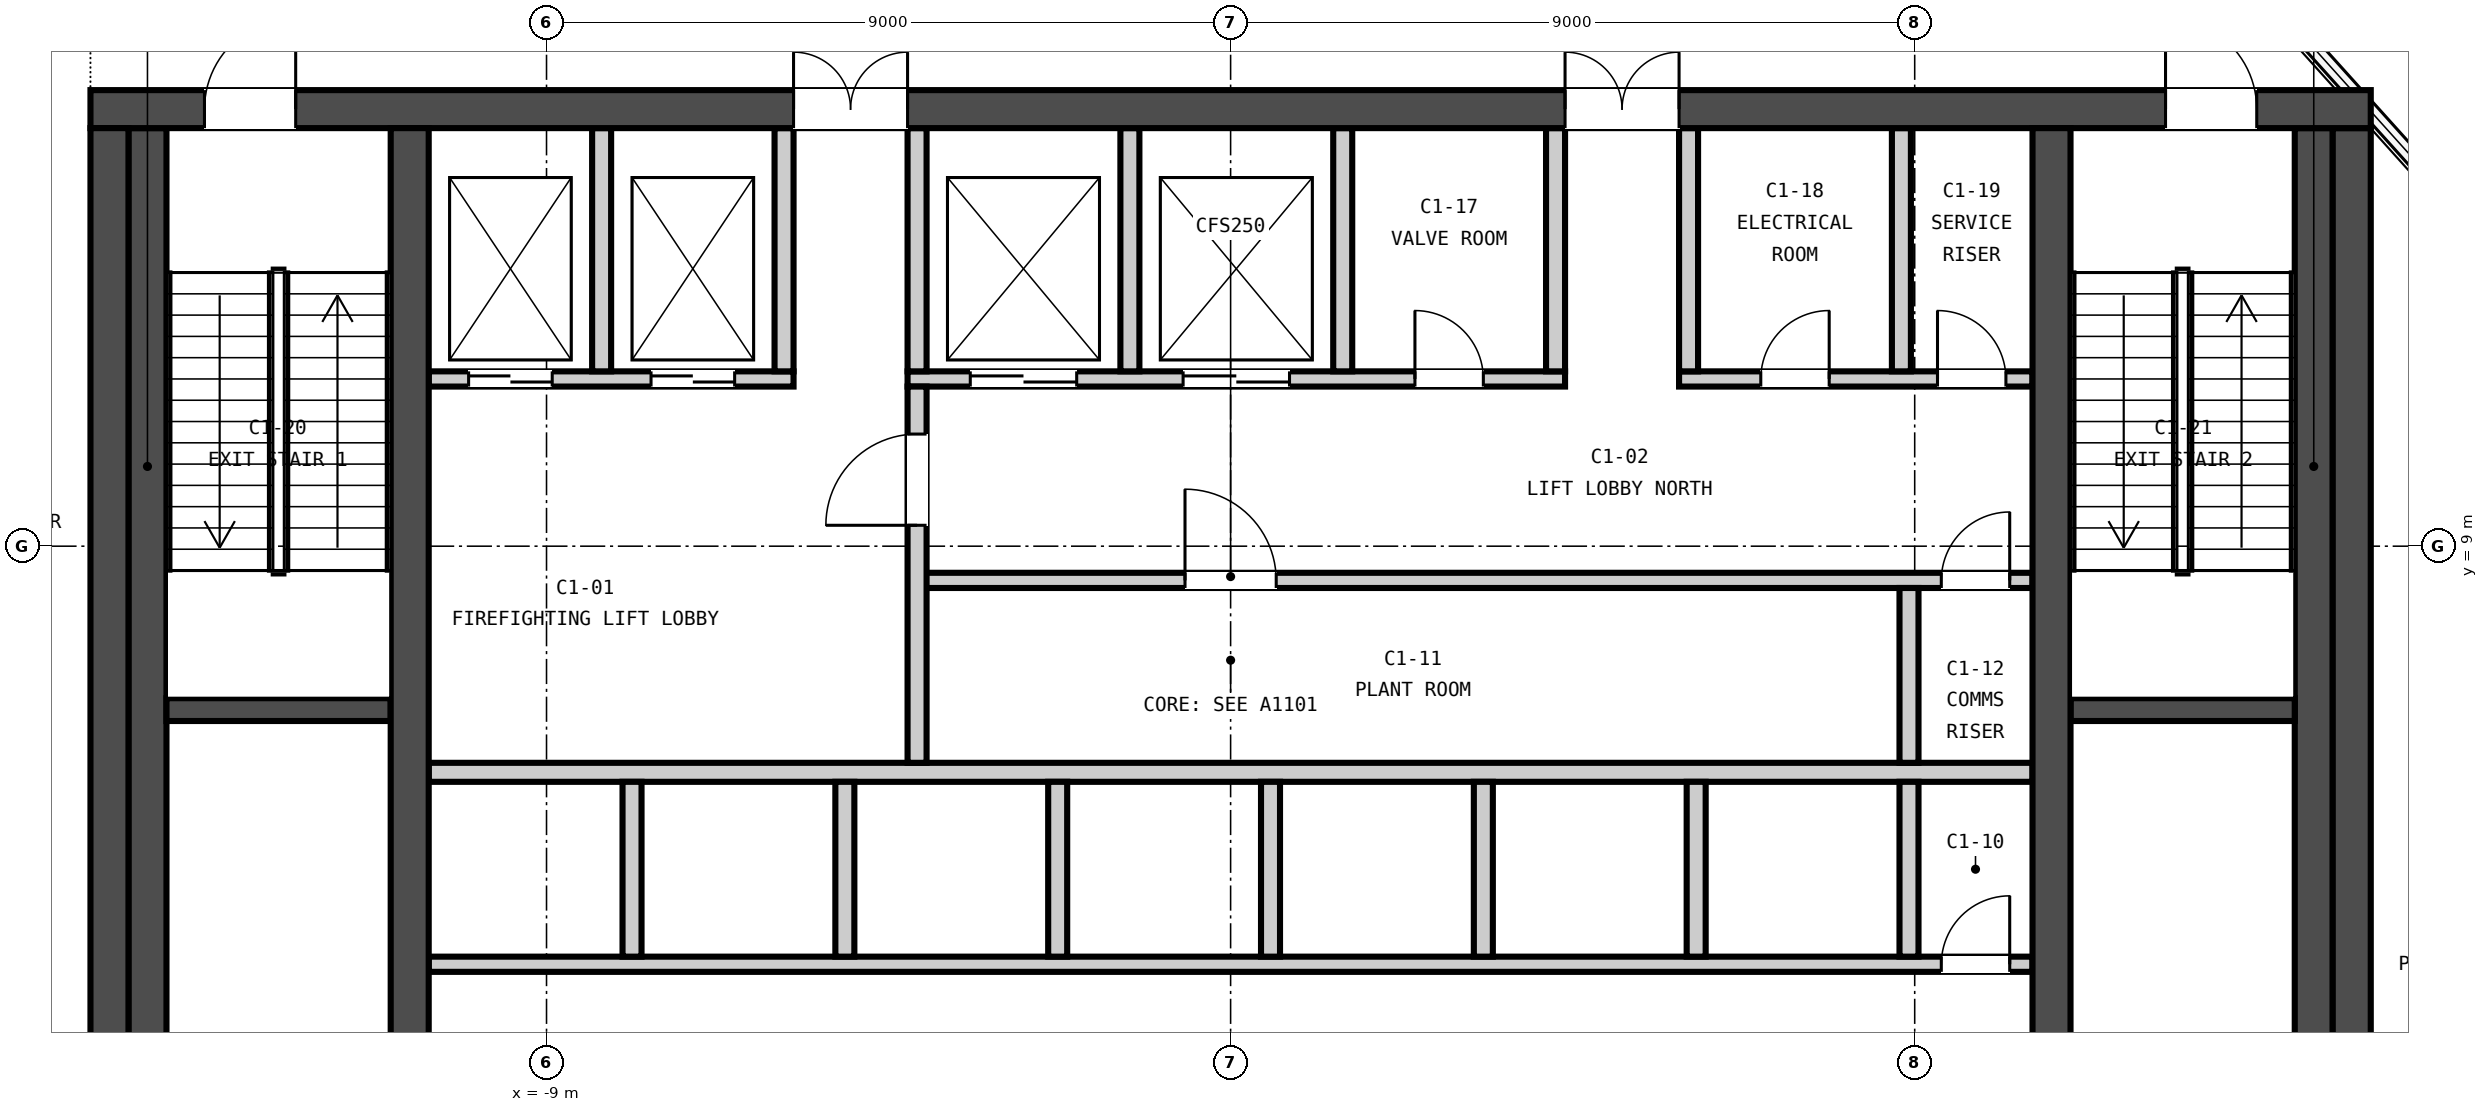
"""IFC4 building model, lengths in metres.
Left out: names, types, materials, properties, quantities, classifications, styles, units other than length and angle.
Written with IfcOpenShell. Run it as: python <this file> out.ifc"""

import sys

from ifc_helpers import new_model, si_unit, direction, frame, frame_2d, origin, place, context, subcontext, project, spatial, rectangle, extrude, element, fill, save


model = new_model("IFC4")
c1 = context("Model", 3, precision=1e-05, world=origin(), true_north=direction((0.0, 1.0)))
c2 = subcontext(c1, "Body", "Model", "MODEL_VIEW")
j1 = project(units=[si_unit("LENGTHUNIT", "METRE"), si_unit("PLANEANGLEUNIT", "RADIAN")], contexts=[c1])
p1 = place(None, origin())
s1 = spatial("IfcSite", under=j1, at=p1, CompositionType="ELEMENT")
p2 = place(p1, origin())
s2 = spatial("IfcBuilding", under=s1, at=p2, CompositionType="ELEMENT")
p3 = place(p2, frame((0.0, 0.0, 301.1)))
s3 = spatial("IfcBuildingStorey", under=s2, at=p3, CompositionType="ELEMENT", Elevation=301.1)
p4 = place(p3, frame((-15.0, 14.75, -0.25), z_axis=(0.0, 0.0, 1.0), x_axis=(1.0, 0.0, 0.0)))
e1 = element("IfcWall", 1, at=p4, inside=s3, PredefinedType="SOLIDWALL", context=c2, shape_type="SweptSolid", body=[
    extrude(rectangle(XDim=30.0, YDim=0.5, at=frame_2d((15.0, 0.0))), origin(), (0.0, 0.0, 1.0), 5.0),
])
p5 = place(p4, frame((9.25, 0.0, 0.25)))
e2 = element("IfcOpeningElement", 2, at=p5, cuts=e1, PredefinedType="OPENING", context=c2, shape_type="SweptSolid", body=[
    extrude(rectangle(XDim=1.5, YDim=2.1, at=frame_2d((0.75, 1.05))), frame((0.0, 0.26, 0.0), z_axis=(0.0, -1.0, 0.0), x_axis=(1.0, 0.0, 0.0)), (0.0, 0.0, 1.0), 0.52),
])
p6 = place(p4, frame((19.4, 0.0, 0.25)))
e3 = element("IfcOpeningElement", 3, at=p6, cuts=e1, PredefinedType="OPENING", context=c2, shape_type="SweptSolid", body=[
    extrude(rectangle(XDim=1.5, YDim=2.1, at=frame_2d((0.75, 1.05))), frame((0.0, 0.26, 0.0), z_axis=(0.0, -1.0, 0.0), x_axis=(1.0, 0.0, 0.0)), (0.0, 0.0, 1.0), 0.52),
])
p7 = place(p4, frame((1.5, 0.0, 0.25)))
e4 = element("IfcOpeningElement", 4, at=p7, cuts=e1, PredefinedType="OPENING", context=c2, shape_type="SweptSolid", body=[
    extrude(rectangle(XDim=1.2, YDim=2.1, at=frame_2d((0.6, 1.05))), frame((0.0, 0.26, 0.0), z_axis=(0.0, -1.0, 0.0), x_axis=(1.0, 0.0, 0.0)), (0.0, 0.0, 1.0), 0.52),
])
p8 = place(p4, frame((27.3, 0.0, 0.25)))
e5 = element("IfcOpeningElement", 5, at=p8, cuts=e1, PredefinedType="OPENING", context=c2, shape_type="SweptSolid", body=[
    extrude(rectangle(XDim=1.2, YDim=2.1, at=frame_2d((0.6, 1.05))), frame((0.0, 0.26, 0.0), z_axis=(0.0, -1.0, 0.0), x_axis=(1.0, 0.0, 0.0)), (0.0, 0.0, 1.0), 0.52),
])
for number, where, z_axis, x_axis in (
    (6, (-14.75, 0.5, -0.25), (0.0, 0.0, 1.0), (0.0, 1.0, 0.0)),
    (7, (14.75, 0.5, -0.25), (0.0, 0.0, 1.0), (0.0, 1.0, 0.0)),
    (8, (-10.8, 0.5, -0.25), (0.0, 0.0, 1.0), (0.0, 1.0, 0.0)),
    (9, (10.8, 0.5, -0.25), (0.0, 0.0, 1.0), (0.0, 1.0, 0.0)),
):
    element("IfcWall", number, at=place(p3, frame(where, z_axis=z_axis, x_axis=x_axis)), inside=s3, PredefinedType="SOLIDWALL", context=c2, shape_type="SweptSolid", body=[
        extrude(rectangle(XDim=14.0, YDim=0.5, at=frame_2d((7.0, 0.0))), origin(), (0.0, 0.0, 1.0), 5.0),
    ])
p9 = place(p3, frame((-10.55, 3.5, 0.0), z_axis=(0.0, 0.0, 1.0), x_axis=(1.0, 0.0, 0.0)))
e10 = element("IfcWall", 10, at=p9, inside=s3, PredefinedType="PARTITIONING", context=c2, shape_type="SweptSolid", body=[
    extrude(rectangle(XDim=21.1, YDim=0.2, at=frame_2d((10.55, 0.0))), origin(), (0.0, 0.0, 1.0), 4.75),
])
p10 = place(p9, frame((19.9, 0.0, 0.0)))
e11 = element("IfcOpeningElement", 11, at=p10, cuts=e10, PredefinedType="OPENING", context=c2, shape_type="SweptSolid", body=[
    extrude(rectangle(XDim=0.9, YDim=2.1, at=frame_2d((0.45, 1.05))), frame((0.0, 0.11, 0.0), z_axis=(0.0, -1.0, 0.0), x_axis=(1.0, 0.0, 0.0)), (0.0, 0.0, 1.0), 0.22),
])
p11 = place(p3, frame((-10.55, 6.025, 0.0), z_axis=(0.0, 0.0, 1.0), x_axis=(1.0, 0.0, 0.0)))
e12 = element("IfcWall", 12, at=p11, inside=s3, PredefinedType="PARTITIONING", context=c2, shape_type="SweptSolid", body=[
    extrude(rectangle(XDim=21.1, YDim=0.25, at=frame_2d((10.55, 0.0))), origin(), (0.0, 0.0, 1.0), 4.75),
])
p12 = place(p3, frame((-4.125, 8.55, 0.0), z_axis=(0.0, 0.0, 1.0), x_axis=(1.0, 0.0, 0.0)))
e13 = element("IfcWall", 13, at=p12, inside=s3, PredefinedType="PARTITIONING", context=c2, shape_type="SweptSolid", body=[
    extrude(rectangle(XDim=14.675, YDim=0.2, at=frame_2d((7.337, 0.0))), origin(), (0.0, 0.0, 1.0), 4.75),
])
p13 = place(p12, frame((3.525, 0.0, 0.0)))
e14 = element("IfcOpeningElement", 14, at=p13, cuts=e13, PredefinedType="OPENING", context=c2, shape_type="SweptSolid", body=[
    extrude(rectangle(XDim=1.2, YDim=2.1, at=frame_2d((0.6, 1.05))), frame((0.0, 0.11, 0.0), z_axis=(0.0, -1.0, 0.0), x_axis=(1.0, 0.0, 0.0)), (0.0, 0.0, 1.0), 0.22),
])
p14 = place(p12, frame((13.475, 0.0, 0.0)))
e15 = element("IfcOpeningElement", 15, at=p14, cuts=e13, PredefinedType="OPENING", context=c2, shape_type="SweptSolid", body=[
    extrude(rectangle(XDim=0.9, YDim=2.1, at=frame_2d((0.45, 1.05))), frame((0.0, 0.11, 0.0), z_axis=(0.0, -1.0, 0.0), x_axis=(1.0, 0.0, 0.0)), (0.0, 0.0, 1.0), 0.22),
])
p15 = place(p3, frame((-10.55, 11.2, 0.0), z_axis=(0.0, 0.0, 1.0), x_axis=(1.0, 0.0, 0.0)))
e16 = element("IfcWall", 16, at=p15, inside=s3, PredefinedType="PARTITIONING", context=c2, shape_type="SweptSolid", body=[
    extrude(rectangle(XDim=4.8, YDim=0.2, at=frame_2d((2.4, 0.0))), origin(), (0.0, 0.0, 1.0), 4.75),
])
p16 = place(p15, frame((0.525, 0.0, 0.0)))
e17 = element("IfcOpeningElement", 17, at=p16, cuts=e16, PredefinedType="OPENING", context=c2, shape_type="SweptSolid", body=[
    extrude(rectangle(XDim=1.1, YDim=2.1, at=frame_2d((0.55, 1.05))), frame((0.0, 0.11, 0.0), z_axis=(0.0, -1.0, 0.0), x_axis=(1.0, 0.0, 0.0)), (0.0, 0.0, 1.0), 0.22),
])
p17 = place(p15, frame((2.925, 0.0, 0.0)))
e18 = element("IfcOpeningElement", 18, at=p17, cuts=e16, PredefinedType="OPENING", context=c2, shape_type="SweptSolid", body=[
    extrude(rectangle(XDim=1.1, YDim=2.1, at=frame_2d((0.55, 1.05))), frame((0.0, 0.11, 0.0), z_axis=(0.0, -1.0, 0.0), x_axis=(1.0, 0.0, 0.0)), (0.0, 0.0, 1.0), 0.22),
])
p18 = place(p3, frame((-4.25, 11.2, 0.0), z_axis=(0.0, 0.0, 1.0), x_axis=(1.0, 0.0, 0.0)))
e19 = element("IfcWall", 19, at=p18, inside=s3, PredefinedType="PARTITIONING", context=c2, shape_type="SweptSolid", body=[
    extrude(rectangle(XDim=8.65, YDim=0.2, at=frame_2d((4.325, 0.0))), origin(), (0.0, 0.0, 1.0), 4.75),
])
p19 = place(p18, frame((0.825, 0.0, 0.0)))
e20 = element("IfcOpeningElement", 20, at=p19, cuts=e19, PredefinedType="OPENING", context=c2, shape_type="SweptSolid", body=[
    extrude(rectangle(XDim=1.4, YDim=2.1, at=frame_2d((0.7, 1.05))), frame((0.0, 0.11, 0.0), z_axis=(0.0, -1.0, 0.0), x_axis=(1.0, 0.0, 0.0)), (0.0, 0.0, 1.0), 0.22),
])
p20 = place(p18, frame((3.625, 0.0, 0.0)))
e21 = element("IfcOpeningElement", 21, at=p20, cuts=e19, PredefinedType="OPENING", context=c2, shape_type="SweptSolid", body=[
    extrude(rectangle(XDim=1.4, YDim=2.1, at=frame_2d((0.7, 1.05))), frame((0.0, 0.11, 0.0), z_axis=(0.0, -1.0, 0.0), x_axis=(1.0, 0.0, 0.0)), (0.0, 0.0, 1.0), 0.22),
])
p21 = place(p18, frame((6.675, 0.0, 0.0)))
e22 = element("IfcOpeningElement", 22, at=p21, cuts=e19, PredefinedType="OPENING", context=c2, shape_type="SweptSolid", body=[
    extrude(rectangle(XDim=0.9, YDim=2.1, at=frame_2d((0.45, 1.05))), frame((0.0, 0.11, 0.0), z_axis=(0.0, -1.0, 0.0), x_axis=(1.0, 0.0, 0.0)), (0.0, 0.0, 1.0), 0.22),
])
p22 = place(p3, frame((5.9, 11.2, 0.0), z_axis=(0.0, 0.0, 1.0), x_axis=(1.0, 0.0, 0.0)))
e23 = element("IfcWall", 23, at=p22, inside=s3, PredefinedType="PARTITIONING", context=c2, shape_type="SweptSolid", body=[
    extrude(rectangle(XDim=4.65, YDim=0.2, at=frame_2d((2.325, 0.0))), origin(), (0.0, 0.0, 1.0), 4.75),
])
p23 = place(p22, frame((1.075, 0.0, 0.0)))
e24 = element("IfcOpeningElement", 24, at=p23, cuts=e23, PredefinedType="OPENING", context=c2, shape_type="SweptSolid", body=[
    extrude(rectangle(XDim=0.9, YDim=2.1, at=frame_2d((0.45, 1.05))), frame((0.0, 0.11, 0.0), z_axis=(0.0, -1.0, 0.0), x_axis=(1.0, 0.0, 0.0)), (0.0, 0.0, 1.0), 0.22),
])
p24 = place(p22, frame((3.4, 0.0, 0.0)))
e25 = element("IfcOpeningElement", 25, at=p24, cuts=e23, PredefinedType="OPENING", context=c2, shape_type="SweptSolid", body=[
    extrude(rectangle(XDim=0.9, YDim=2.1, at=frame_2d((0.45, 1.05))), frame((0.0, 0.11, 0.0), z_axis=(0.0, -1.0, 0.0), x_axis=(1.0, 0.0, 0.0)), (0.0, 0.0, 1.0), 0.22),
])
p25 = place(p3, frame((-4.125, 6.15, 0.0), z_axis=(0.0, 0.0, 1.0), x_axis=(0.0, 1.0, 0.0)))
e26 = element("IfcWall", 26, at=p25, inside=s3, PredefinedType="PARTITIONING", context=c2, shape_type="SweptSolid", body=[
    extrude(rectangle(XDim=4.95, YDim=0.25, at=frame_2d((2.475, 0.0))), origin(), (0.0, 0.0, 1.0), 4.75),
])
p26 = place(p25, frame((3.125, 0.0, 0.0)))
e27 = element("IfcOpeningElement", 27, at=p26, cuts=e26, PredefinedType="OPENING", context=c2, shape_type="SweptSolid", body=[
    extrude(rectangle(XDim=1.2, YDim=2.1, at=frame_2d((0.6, 1.05))), frame((0.0, 0.135, 0.0), z_axis=(0.0, -1.0, 0.0), x_axis=(1.0, 0.0, 0.0)), (0.0, 0.0, 1.0), 0.27),
])
for number, where, z_axis, x_axis in (
    (28, (-7.875, 3.6, 0.0), (0.0, 0.0, 1.0), (0.0, 1.0, 0.0)),
    (29, (-5.075, 3.6, 0.0), (0.0, 0.0, 1.0), (0.0, 1.0, 0.0)),
    (30, (-2.275, 3.6, 0.0), (0.0, 0.0, 1.0), (0.0, 1.0, 0.0)),
    (31, (0.525, 3.6, 0.0), (0.0, 0.0, 1.0), (0.0, 1.0, 0.0)),
    (32, (3.325, 3.6, 0.0), (0.0, 0.0, 1.0), (0.0, 1.0, 0.0)),
    (33, (6.125, 3.6, 0.0), (0.0, 0.0, 1.0), (0.0, 1.0, 0.0)),
    (34, (8.925, 3.6, 0.0), (0.0, 0.0, 1.0), (0.0, 1.0, 0.0)),
):
    element("IfcWall", number, at=place(p3, frame(where, z_axis=z_axis, x_axis=x_axis)), inside=s3, PredefinedType="PARTITIONING", context=c2, shape_type="SweptSolid", body=[
        extrude(rectangle(XDim=2.3, YDim=0.25, at=frame_2d((1.15, 0.0))), origin(), (0.0, 0.0, 1.0), 4.75),
    ])
p27 = place(p3, frame((8.925, 6.15, 0.0), z_axis=(0.0, 0.0, 1.0), x_axis=(0.0, 1.0, 0.0)))
e35 = element("IfcWall", 35, at=p27, inside=s3, PredefinedType="PARTITIONING", context=c2, shape_type="SweptSolid", body=[
    extrude(rectangle(XDim=2.3, YDim=0.25, at=frame_2d((1.15, 0.0))), origin(), (0.0, 0.0, 1.0), 4.75),
])
for number, where, z_axis, x_axis in (
    (36, (-8.275, 11.3, 0.0), (0.0, 0.0, 1.0), (0.0, 1.0, 0.0)),
    (37, (-5.875, 11.3, 0.0), (0.0, 0.0, 1.0), (0.0, 1.0, 0.0)),
    (38, (-4.125, 11.3, 0.0), (0.0, 0.0, 1.0), (0.0, 1.0, 0.0)),
    (39, (-1.325, 11.3, 0.0), (0.0, 0.0, 1.0), (0.0, 1.0, 0.0)),
    (40, (1.475, 11.3, 0.0), (0.0, 0.0, 1.0), (0.0, 1.0, 0.0)),
    (41, (4.275, 11.3, 0.0), (0.0, 0.0, 1.0), (0.0, 1.0, 0.0)),
    (42, (6.025, 11.3, 0.0), (0.0, 0.0, 1.0), (0.0, 1.0, 0.0)),
    (43, (8.825, 11.3, 0.0), (0.0, 0.0, 1.0), (0.0, 1.0, 0.0)),
):
    element("IfcWall", number, at=place(p3, frame(where, z_axis=z_axis, x_axis=x_axis)), inside=s3, PredefinedType="PARTITIONING", context=c2, shape_type="SweptSolid", body=[
        extrude(rectangle(XDim=3.2, YDim=0.25, at=frame_2d((1.6, 0.0))), origin(), (0.0, 0.0, 1.0), 4.75),
    ])
p28 = place(p3, frame((-14.0, 6.85, 0.0), z_axis=(0.0, 0.0, 1.0), x_axis=(1.0, 0.0, 0.0)))
e44 = element("IfcWall", 44, at=p28, inside=s3, PredefinedType="SOLIDWALL", context=c2, shape_type="SweptSolid", body=[
    extrude(rectangle(XDim=2.95, YDim=0.3, at=frame_2d((1.475, 0.0))), origin(), (0.0, 0.0, 1.0), 4.75),
])
p29 = place(p3, frame((-14.25, 0.5, 0.0), z_axis=(0.0, 0.0, 1.0), x_axis=(0.0, 1.0, 0.0)))
e45 = element("IfcWall", 45, at=p29, inside=s3, PredefinedType="SOLIDWALL", context=c2, shape_type="SweptSolid", body=[
    extrude(rectangle(XDim=14.0, YDim=0.5, at=frame_2d((7.0, 0.0))), origin(), (0.0, 0.0, 1.0), 4.75),
])
p30 = place(p3, frame((11.05, 6.85, 0.0), z_axis=(0.0, 0.0, 1.0), x_axis=(1.0, 0.0, 0.0)))
e46 = element("IfcWall", 46, at=p30, inside=s3, PredefinedType="SOLIDWALL", context=c2, shape_type="SweptSolid", body=[
    extrude(rectangle(XDim=2.95, YDim=0.3, at=frame_2d((1.475, 0.0))), origin(), (0.0, 0.0, 1.0), 4.75),
])
p31 = place(p3, frame((14.25, 0.5, 0.0), z_axis=(0.0, 0.0, 1.0), x_axis=(0.0, 1.0, 0.0)))
e47 = element("IfcWall", 47, at=p31, inside=s3, PredefinedType="SOLIDWALL", context=c2, shape_type="SweptSolid", body=[
    extrude(rectangle(XDim=14.0, YDim=0.5, at=frame_2d((7.0, 0.0))), origin(), (0.0, 0.0, 1.0), 4.75),
])
p32 = place(p26, origin())
e48 = element("IfcDoor", 48, at=p32, inside=s3, OperationType="SINGLE_SWING_LEFT", PredefinedType="DOOR", context=c2, shape_type="SweptSolid", body=[
    extrude(rectangle(XDim=1.2, YDim=2.1, at=frame_2d((0.6, 1.05))), frame((0.0, 0.025, 0.0), z_axis=(0.0, -1.0, 0.0), x_axis=(1.0, 0.0, 0.0)), (0.0, 0.0, 1.0), 0.05),
])
fill(e27, e48)
p33 = place(p10, origin())
e49 = element("IfcDoor", 49, at=p33, inside=s3, OperationType="SINGLE_SWING_RIGHT", PredefinedType="DOOR", context=c2, shape_type="SweptSolid", body=[
    extrude(rectangle(XDim=0.9, YDim=2.1, at=frame_2d((0.45, 1.05))), frame((0.0, 0.025, 0.0), z_axis=(0.0, -1.0, 0.0), x_axis=(1.0, 0.0, 0.0)), (0.0, 0.0, 1.0), 0.05),
])
fill(e11, e49)
p34 = place(p13, origin())
e50 = element("IfcDoor", 50, at=p34, inside=s3, OperationType="SINGLE_SWING_LEFT", PredefinedType="DOOR", context=c2, shape_type="SweptSolid", body=[
    extrude(rectangle(XDim=1.2, YDim=2.1, at=frame_2d((0.6, 1.05))), frame((0.0, 0.025, 0.0), z_axis=(0.0, -1.0, 0.0), x_axis=(1.0, 0.0, 0.0)), (0.0, 0.0, 1.0), 0.05),
])
fill(e14, e50)
p35 = place(p14, origin())
e51 = element("IfcDoor", 51, at=p35, inside=s3, OperationType="SINGLE_SWING_RIGHT", PredefinedType="DOOR", context=c2, shape_type="SweptSolid", body=[
    extrude(rectangle(XDim=0.9, YDim=2.1, at=frame_2d((0.45, 1.05))), frame((0.0, 0.025, 0.0), z_axis=(0.0, -1.0, 0.0), x_axis=(1.0, 0.0, 0.0)), (0.0, 0.0, 1.0), 0.05),
])
fill(e15, e51)
p36 = place(p16, origin())
e52 = element("IfcDoor", 52, at=p36, inside=s3, OperationType="DOUBLE_DOOR_SLIDING", PredefinedType="DOOR", context=c2, shape_type="SweptSolid", body=[
    extrude(rectangle(XDim=1.1, YDim=2.1, at=frame_2d((0.55, 1.05))), frame((0.0, 0.025, 0.0), z_axis=(0.0, -1.0, 0.0), x_axis=(1.0, 0.0, 0.0)), (0.0, 0.0, 1.0), 0.05),
])
fill(e17, e52)
p37 = place(p17, origin())
e53 = element("IfcDoor", 53, at=p37, inside=s3, OperationType="DOUBLE_DOOR_SLIDING", PredefinedType="DOOR", context=c2, shape_type="SweptSolid", body=[
    extrude(rectangle(XDim=1.1, YDim=2.1, at=frame_2d((0.55, 1.05))), frame((0.0, 0.025, 0.0), z_axis=(0.0, -1.0, 0.0), x_axis=(1.0, 0.0, 0.0)), (0.0, 0.0, 1.0), 0.05),
])
fill(e18, e53)
p38 = place(p19, origin())
e54 = element("IfcDoor", 54, at=p38, inside=s3, OperationType="DOUBLE_DOOR_SLIDING", PredefinedType="DOOR", context=c2, shape_type="SweptSolid", body=[
    extrude(rectangle(XDim=1.4, YDim=2.1, at=frame_2d((0.7, 1.05))), frame((0.0, 0.025, 0.0), z_axis=(0.0, -1.0, 0.0), x_axis=(1.0, 0.0, 0.0)), (0.0, 0.0, 1.0), 0.05),
])
fill(e20, e54)
p39 = place(p20, origin())
e55 = element("IfcDoor", 55, at=p39, inside=s3, OperationType="DOUBLE_DOOR_SLIDING", PredefinedType="DOOR", context=c2, shape_type="SweptSolid", body=[
    extrude(rectangle(XDim=1.4, YDim=2.1, at=frame_2d((0.7, 1.05))), frame((0.0, 0.025, 0.0), z_axis=(0.0, -1.0, 0.0), x_axis=(1.0, 0.0, 0.0)), (0.0, 0.0, 1.0), 0.05),
])
fill(e21, e55)
p40 = place(p21, origin())
e56 = element("IfcDoor", 56, at=p40, inside=s3, OperationType="SINGLE_SWING_LEFT", PredefinedType="DOOR", context=c2, shape_type="SweptSolid", body=[
    extrude(rectangle(XDim=0.9, YDim=2.1, at=frame_2d((0.45, 1.05))), frame((0.0, 0.025, 0.0), z_axis=(0.0, -1.0, 0.0), x_axis=(1.0, 0.0, 0.0)), (0.0, 0.0, 1.0), 0.05),
])
fill(e22, e56)
p41 = place(p23, origin())
e57 = element("IfcDoor", 57, at=p41, inside=s3, OperationType="SINGLE_SWING_RIGHT", PredefinedType="DOOR", context=c2, shape_type="SweptSolid", body=[
    extrude(rectangle(XDim=0.9, YDim=2.1, at=frame_2d((0.45, 1.05))), frame((0.0, 0.025, 0.0), z_axis=(0.0, -1.0, 0.0), x_axis=(1.0, 0.0, 0.0)), (0.0, 0.0, 1.0), 0.05),
])
fill(e24, e57)
p42 = place(p24, origin())
e58 = element("IfcDoor", 58, at=p42, inside=s3, OperationType="SINGLE_SWING_LEFT", PredefinedType="DOOR", context=c2, shape_type="SweptSolid", body=[
    extrude(rectangle(XDim=0.9, YDim=2.1, at=frame_2d((0.45, 1.05))), frame((0.0, 0.025, 0.0), z_axis=(0.0, -1.0, 0.0), x_axis=(1.0, 0.0, 0.0)), (0.0, 0.0, 1.0), 0.05),
])
fill(e25, e58)
p43 = place(p5, origin())
e59 = element("IfcDoor", 59, at=p43, inside=s3, OperationType="DOUBLE_DOOR_SINGLE_SWING", PredefinedType="DOOR", context=c2, shape_type="SweptSolid", body=[
    extrude(rectangle(XDim=1.5, YDim=2.1, at=frame_2d((0.75, 1.05))), frame((0.0, 0.025, 0.0), z_axis=(0.0, -1.0, 0.0), x_axis=(1.0, 0.0, 0.0)), (0.0, 0.0, 1.0), 0.05),
])
fill(e2, e59)
p44 = place(p6, origin())
e60 = element("IfcDoor", 60, at=p44, inside=s3, OperationType="DOUBLE_DOOR_SINGLE_SWING", PredefinedType="DOOR", context=c2, shape_type="SweptSolid", body=[
    extrude(rectangle(XDim=1.5, YDim=2.1, at=frame_2d((0.75, 1.05))), frame((0.0, 0.025, 0.0), z_axis=(0.0, -1.0, 0.0), x_axis=(1.0, 0.0, 0.0)), (0.0, 0.0, 1.0), 0.05),
])
fill(e3, e60)
p45 = place(p7, origin())
e61 = element("IfcDoor", 61, at=p45, inside=s3, OperationType="SINGLE_SWING_RIGHT", PredefinedType="DOOR", context=c2, shape_type="SweptSolid", body=[
    extrude(rectangle(XDim=1.2, YDim=2.1, at=frame_2d((0.6, 1.05))), frame((0.0, 0.025, 0.0), z_axis=(0.0, -1.0, 0.0), x_axis=(1.0, 0.0, 0.0)), (0.0, 0.0, 1.0), 0.05),
])
fill(e4, e61)
p46 = place(p8, origin())
e62 = element("IfcDoor", 62, at=p46, inside=s3, OperationType="SINGLE_SWING_LEFT", PredefinedType="DOOR", context=c2, shape_type="SweptSolid", body=[
    extrude(rectangle(XDim=1.2, YDim=2.1, at=frame_2d((0.6, 1.05))), frame((0.0, 0.025, 0.0), z_axis=(0.0, -1.0, 0.0), x_axis=(1.0, 0.0, 0.0)), (0.0, 0.0, 1.0), 0.05),
])
fill(e5, e62)
save(model, sys.argv[1])
